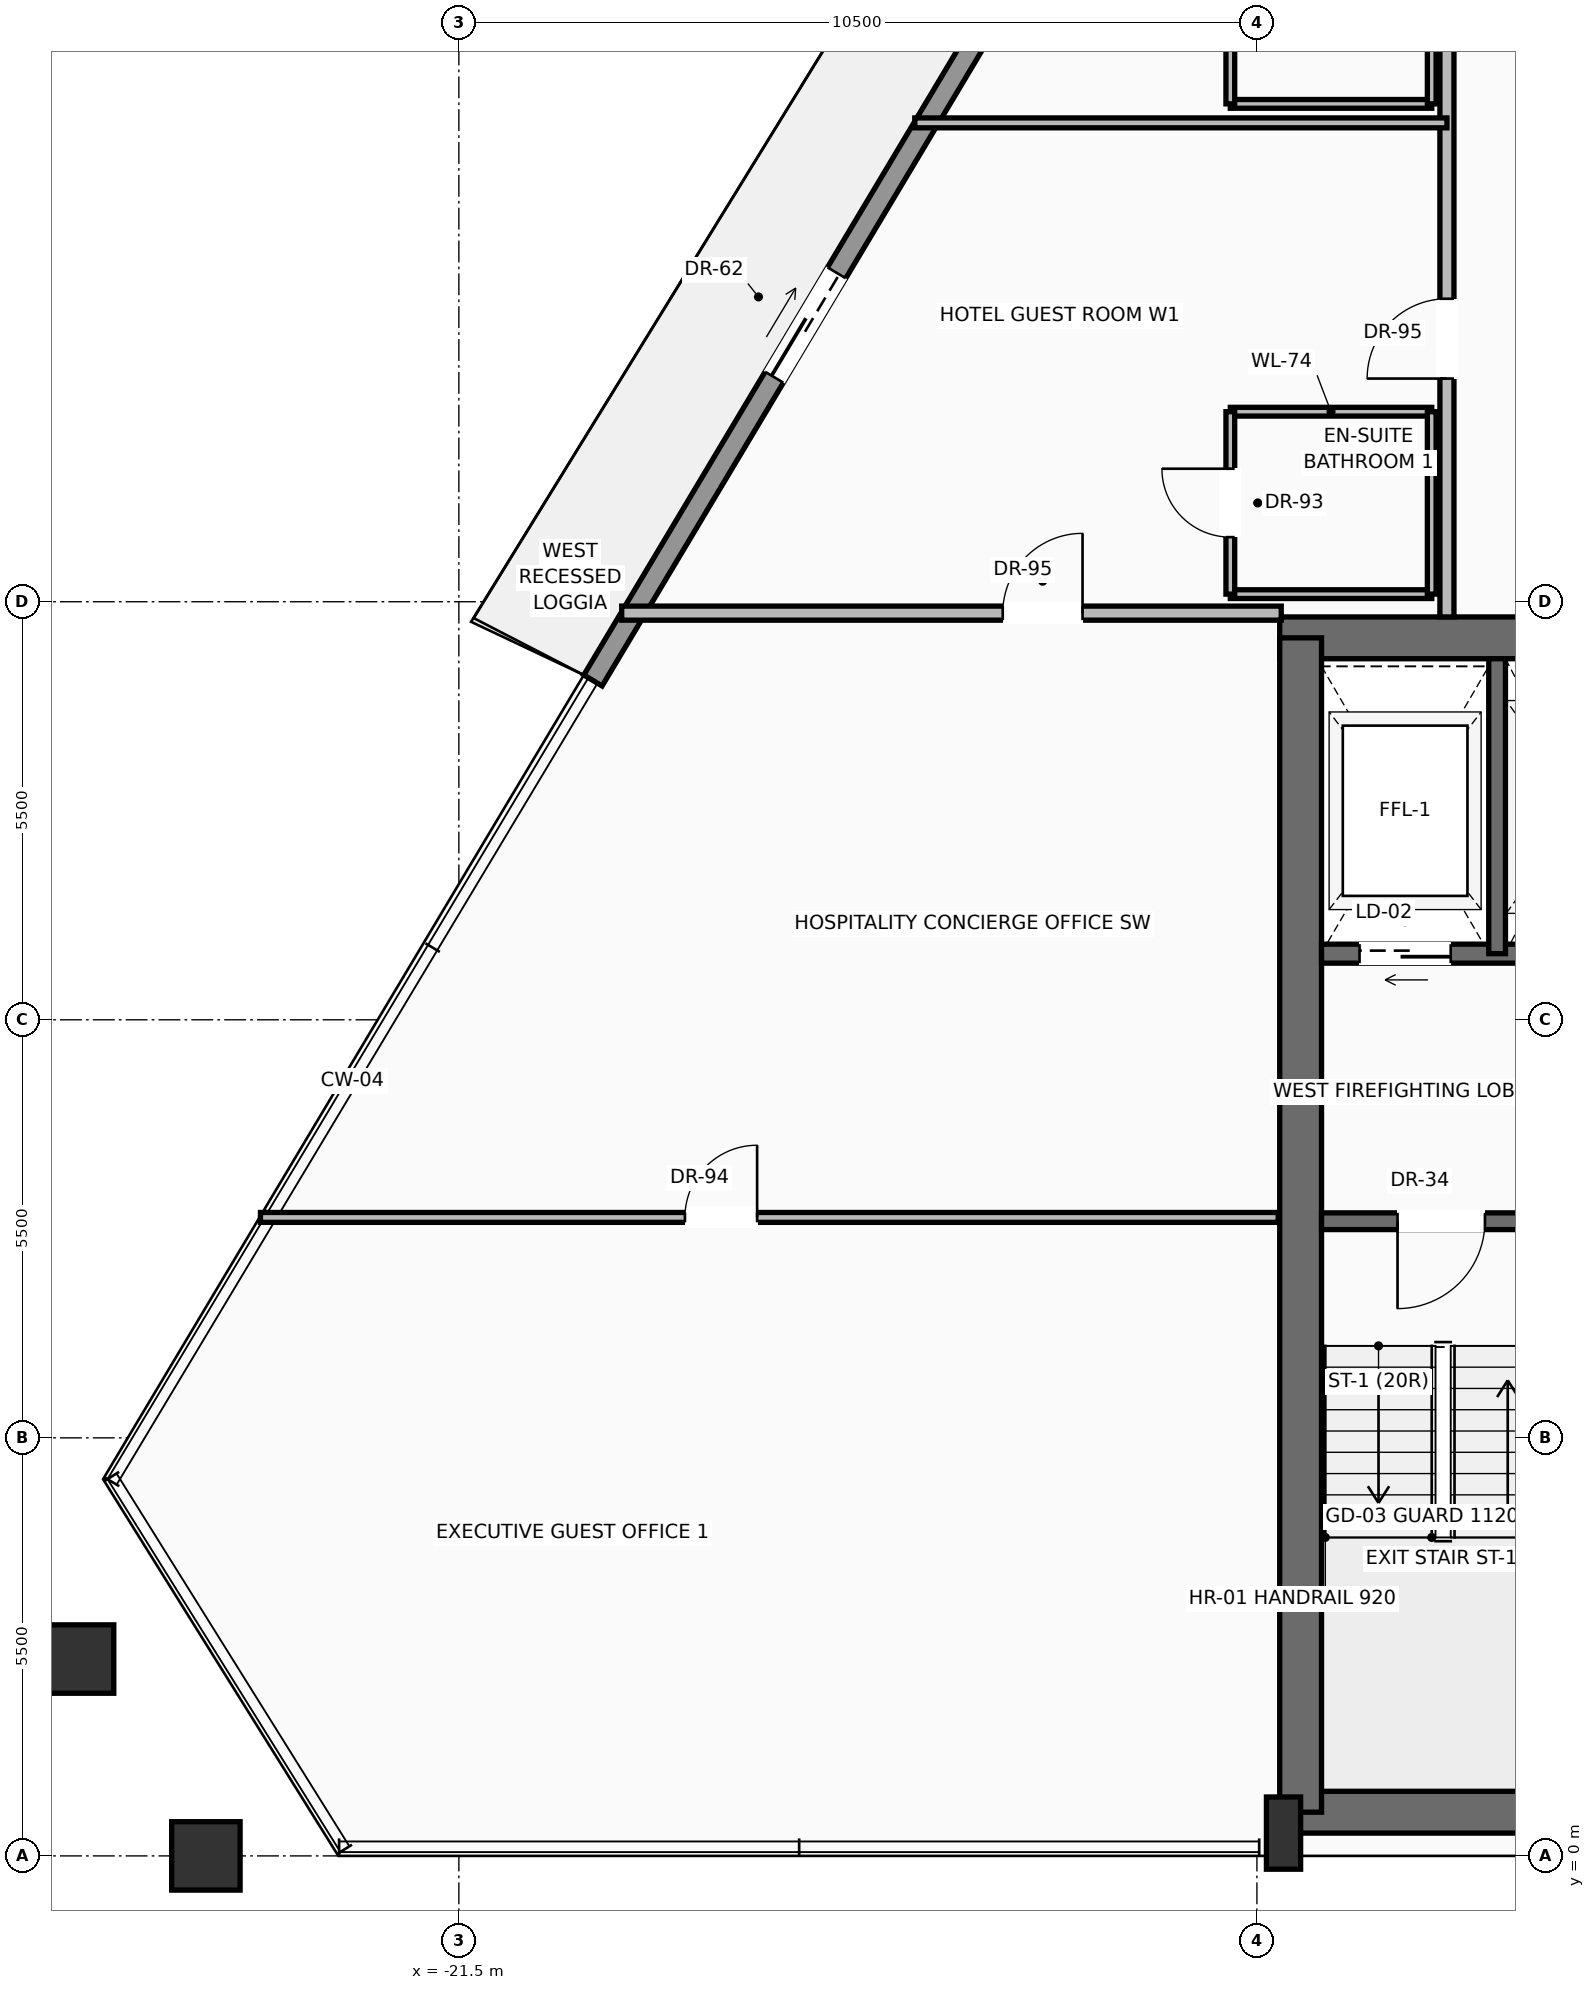
"""IFC4 building model, lengths in metres.
Left out: names, types, materials, properties, quantities, classifications, styles, units other than length and angle.
Written with IfcOpenShell. Run it as: python <this file> out.ifc"""

import sys

from ifc_helpers import new_model, si_unit, direction, frame, frame_2d, origin, origin_2d, place, context, subcontext, project, spatial, rectangle, hollow_rectangle, extrude, source, transform, mapped, element, fill, save


model = new_model("IFC4")
c1 = context("Model", 3, precision=1e-05, world=origin(), true_north=direction((0.0, 1.0)))
c2 = subcontext(c1, "Body", "Model", "MODEL_VIEW")
j1 = project(units=[si_unit("LENGTHUNIT", "METRE"), si_unit("PLANEANGLEUNIT", "RADIAN")], contexts=[c1])
p1 = place(None, origin())
s1 = spatial("IfcSite", under=j1, at=p1, CompositionType="ELEMENT")
p2 = place(p1, origin())
s2 = spatial("IfcBuilding", under=s1, at=p2, CompositionType="ELEMENT")
p3 = place(p2, frame((0.0, 0.0, 223.45)))
s3 = spatial("IfcBuildingStorey", under=s2, at=p3, CompositionType="ELEMENT", Elevation=223.45)
p4 = place(p3, frame((-10.65, 0.575, 0.0), z_axis=(0.0, 0.0, 1.0), x_axis=(1.0, 0.0, 0.0)))
e1 = element("IfcWall", 1, at=p4, inside=s3, PredefinedType="SHEAR", context=c2, shape_type="SweptSolid", body=[
    extrude(rectangle(XDim=21.3, YDim=0.55, at=frame_2d((10.65, 0.0))), origin(), (0.0, 0.0, 1.0), 3.24),
])
p5 = place(p3, frame((-10.7, 16.025, 0.0), z_axis=(0.0, 0.0, 1.0), x_axis=(1.0, 0.0, 0.0)))
e2 = element("IfcWall", 2, at=p5, inside=s3, PredefinedType="SHEAR", context=c2, shape_type="SweptSolid", body=[
    extrude(rectangle(XDim=21.4, YDim=0.55, at=frame_2d((10.7, 0.0))), origin(), (0.0, 0.0, 1.0), 3.24),
])
p6 = place(p5, frame((3.27, 0.0, 0.0)))
e3 = element("IfcOpeningElement", 3, at=p6, cuts=e2, PredefinedType="OPENING", context=c2, shape_type="SweptSolid", body=[
    extrude(rectangle(XDim=1.3, YDim=2.3, at=frame_2d((0.65, 1.15))), frame((0.0, 0.285, 0.0), z_axis=(0.0, -1.0, 0.0), x_axis=(1.0, 0.0, 0.0)), (0.0, 0.0, 1.0), 0.57),
])
p7 = place(p5, frame((9.7, 0.0, 0.0)))
e4 = element("IfcOpeningElement", 4, at=p7, cuts=e2, PredefinedType="OPENING", context=c2, shape_type="SweptSolid", body=[
    extrude(rectangle(XDim=2.0, YDim=2.4, at=frame_2d((1.0, 1.2))), frame((0.0, 0.285, 0.0), z_axis=(0.0, -1.0, 0.0), x_axis=(1.0, 0.0, 0.0)), (0.0, 0.0, 1.0), 0.57),
])
p8 = place(p3, frame((-10.425, 0.575, 0.0), z_axis=(0.0, 0.0, 1.0), x_axis=(0.0, 1.0, 0.0)))
e5 = element("IfcWall", 5, at=p8, inside=s3, PredefinedType="SHEAR", context=c2, shape_type="SweptSolid", body=[
    extrude(rectangle(XDim=15.45, YDim=0.55, at=frame_2d((7.725, 0.0))), origin(), (0.0, 0.0, 1.0), 3.24),
])
m1 = source(origin(), c2, "Body", "SweptSolid", [
    extrude(rectangle(XDim=0.45, YDim=0.95, at=origin_2d()), origin(), (0.0, 0.0, 1.0), 3.45),
])
p9 = place(p3, frame((-10.65, 0.3, 0.0), z_axis=(0.0, 0.0, 1.0), x_axis=(1.0, 0.0, 0.0)))
e6 = element("IfcColumn", 6, at=p9, inside=s3, PredefinedType="PILASTER", context=c2, shape_type="MappedRepresentation", body=[
    mapped(m1, transform((0.0, 0.0, 0.0), scale=1.0)),
])
m2 = source(origin(), c2, "Body", "SweptSolid", [
    extrude(hollow_rectangle(XDim=0.9, YDim=0.9, WallThickness=0.045, at=origin_2d()), origin(), (0.0, 0.0, 1.0), 3.441),
])
p10 = place(p3, frame((-24.828, 0.0, 0.004), z_axis=(-0.004753404971, 0.0, 0.999988702507), x_axis=(0.0, -1.0, 0.0)))
e7 = element("IfcColumn", 7, at=p10, inside=s3, PredefinedType="COLUMN", context=c2, shape_type="MappedRepresentation", body=[
    mapped(m2, transform((0.0, 0.0, 0.0), scale=1.0)),
])
m3 = source(origin(), c2, "Body", "SweptSolid", [
    extrude(hollow_rectangle(XDim=0.9, YDim=0.9, WallThickness=0.045, at=origin_2d()), origin(), (0.0, 0.0, 1.0), 3.442),
])
p11 = place(p3, frame((-26.49, 2.59, 0.004), z_axis=(0.007589951028, -0.017591662196, 0.999816446186), x_axis=(0.918184808278, 0.396152316475, 0.0)))
e8 = element("IfcColumn", 8, at=p11, inside=s3, PredefinedType="COLUMN", context=c2, shape_type="MappedRepresentation", body=[
    mapped(m3, transform((0.0, 0.0, 0.0), scale=1.0)),
])
p12 = place(p3, frame((-19.736, 15.464, 0.0), z_axis=(0.0, 0.0, 1.0), x_axis=(0.513136432844, 0.858307055364, 0.0)))
e9 = element("IfcWall", 9, at=p12, inside=s3, PredefinedType="SOLIDWALL", context=c2, shape_type="SweptSolid", body=[
    extrude(rectangle(XDim=19.37, YDim=0.28, at=frame_2d((9.685, 0.0))), origin(), (0.0, 0.0, 1.0), 2.82),
])
p13 = place(p12, frame((4.649, 0.0, 0.0)))
e10 = element("IfcOpeningElement", 10, at=p13, cuts=e9, PredefinedType="OPENING", context=c2, shape_type="SweptSolid", body=[
    extrude(rectangle(XDim=1.6, YDim=2.35, at=frame_2d((0.8, 1.175))), frame((0.0, 0.15, 0.0), z_axis=(0.0, -1.0, 0.0), x_axis=(1.0, 0.0, 0.0)), (0.0, 0.0, 1.0), 0.3),
])
p14 = place(p12, frame((13.171, 0.0, 0.9)))
e11 = element("IfcOpeningElement", 11, at=p14, cuts=e9, PredefinedType="OPENING", context=c2, shape_type="SweptSolid", body=[
    extrude(rectangle(XDim=1.55, YDim=1.75, at=frame_2d((0.775, 0.875))), frame((0.0, 0.15, 0.0), z_axis=(0.0, -1.0, 0.0), x_axis=(1.0, 0.0, 0.0)), (0.0, 0.0, 1.0), 0.3),
])
p15 = place(p3, frame((-5.5, 8.35, 0.0), z_axis=(0.0, 0.0, 1.0), x_axis=(-1.0, 0.0, 0.0)))
e12 = element("IfcWall", 12, at=p15, inside=s3, PredefinedType="SOLIDWALL", context=c2, shape_type="SweptSolid", body=[
    extrude(rectangle(XDim=4.65, YDim=0.22, at=frame_2d((2.325, 0.0))), origin(), (0.0, 0.0, 1.0), 3.24),
])
p16 = place(p15, frame((2.5, 0.0, 0.0)))
e13 = element("IfcOpeningElement", 13, at=p16, cuts=e12, PredefinedType="OPENING", context=c2, shape_type="SweptSolid", body=[
    extrude(rectangle(XDim=1.15, YDim=2.2, at=frame_2d((0.575, 1.1))), frame((0.0, 0.12, 0.0), z_axis=(0.0, -1.0, 0.0), x_axis=(1.0, 0.0, 0.0)), (0.0, 0.0, 1.0), 0.24),
])
p17 = place(p3, frame((-5.5, 11.87, 0.0), z_axis=(0.0, 0.0, 1.0), x_axis=(-1.0, 0.0, 0.0)))
e14 = element("IfcWall", 14, at=p17, inside=s3, PredefinedType="SOLIDWALL", context=c2, shape_type="SweptSolid", body=[
    extrude(rectangle(XDim=4.65, YDim=0.25, at=frame_2d((2.325, 0.0))), origin(), (0.0, 0.0, 1.0), 3.24),
])
p18 = place(p17, frame((2.95, 0.0, 0.0)))
e15 = element("IfcOpeningElement", 15, at=p18, cuts=e14, PredefinedType="OPENING", context=c2, shape_type="SweptSolid", body=[
    extrude(rectangle(XDim=1.2, YDim=2.25, at=frame_2d((0.6, 1.125))), frame((0.0, 0.135, 0.0), z_axis=(0.0, -1.0, 0.0), x_axis=(1.0, 0.0, 0.0)), (0.0, 0.0, 1.0), 0.27),
])
p19 = place(p3, frame((-7.84, 11.87, 0.0), z_axis=(0.0, 0.0, 1.0), x_axis=(0.0, 1.0, 0.0)))
e16 = element("IfcWall", 16, at=p19, inside=s3, PredefinedType="SOLIDWALL", context=c2, shape_type="SweptSolid", body=[
    extrude(rectangle(XDim=3.88, YDim=0.22, at=frame_2d((1.94, 0.0))), origin(), (0.0, 0.0, 1.0), 3.24),
])
p20 = place(p3, frame((-8.5, 16.3, 0.0), z_axis=(0.0, 0.0, 1.0), x_axis=(0.0, 1.0, 0.0)))
e17 = element("IfcWall", 17, at=p20, inside=s3, PredefinedType="PARTITIONING", context=c2, shape_type="SweptSolid", body=[
    extrude(rectangle(XDim=13.3, YDim=0.185, at=frame_2d((6.65, 0.0))), origin(), (0.0, 0.0, 1.0), 3.232),
])
p21 = place(p20, frame((3.136, 0.0, 0.0)))
e18 = element("IfcOpeningElement", 18, at=p21, cuts=e17, PredefinedType="OPENING", context=c2, shape_type="SweptSolid", body=[
    extrude(rectangle(XDim=1.05, YDim=2.25, at=frame_2d((0.525, 1.125))), frame((0.0, 0.103, 0.0), z_axis=(0.0, -1.0, 0.0), x_axis=(1.0, 0.0, 0.0)), (0.0, 0.0, 1.0), 0.205),
])
p22 = place(p20, frame((9.256, 0.0, 0.0)))
e19 = element("IfcOpeningElement", 19, at=p22, cuts=e17, PredefinedType="OPENING", context=c2, shape_type="SweptSolid", body=[
    extrude(rectangle(XDim=1.05, YDim=2.25, at=frame_2d((0.525, 1.125))), frame((0.0, 0.103, 0.0), z_axis=(0.0, -1.0, 0.0), x_axis=(1.0, 0.0, 0.0)), (0.0, 0.0, 1.0), 0.205),
])
p23 = place(p3, frame((-19.358, 16.35, 0.0), z_axis=(0.0, 0.0, 1.0), x_axis=(1.0, 0.0, 0.0)))
e20 = element("IfcWall", 20, at=p23, inside=s3, PredefinedType="PARTITIONING", context=c2, shape_type="SweptSolid", body=[
    extrude(rectangle(XDim=8.678, YDim=0.185, at=frame_2d((4.339, 0.0))), origin(), (0.0, 0.0, 1.0), 3.232),
])
p24 = place(p23, frame((5.013, 0.0, 0.0)))
e21 = element("IfcOpeningElement", 21, at=p24, cuts=e20, PredefinedType="OPENING", context=c2, shape_type="SweptSolid", body=[
    extrude(rectangle(XDim=1.05, YDim=2.25, at=frame_2d((0.525, 1.125))), frame((0.0, 0.103, 0.0), z_axis=(0.0, -1.0, 0.0), x_axis=(1.0, 0.0, 0.0)), (0.0, 0.0, 1.0), 0.205),
])
p25 = place(p3, frame((-24.111, 8.4, 0.0), z_axis=(0.0, 0.0, 1.0), x_axis=(1.0, 0.0, 0.0)))
e22 = element("IfcWall", 22, at=p25, inside=s3, PredefinedType="PARTITIONING", context=c2, shape_type="SweptSolid", body=[
    extrude(rectangle(XDim=13.391, YDim=0.13, at=frame_2d((6.695, 0.0))), origin(), (0.0, 0.0, 1.0), 3.232),
])
p26 = place(p25, frame((5.585, 0.0, 0.0)))
e23 = element("IfcOpeningElement", 23, at=p26, cuts=e22, PredefinedType="OPENING", context=c2, shape_type="SweptSolid", body=[
    extrude(rectangle(XDim=0.95, YDim=2.2, at=frame_2d((0.475, 1.1))), frame((0.0, 0.075, 0.0), z_axis=(0.0, -1.0, 0.0), x_axis=(1.0, 0.0, 0.0)), (0.0, 0.0, 1.0), 0.15),
])
for number, where, z_axis, x_axis in (
    (24, (-11.35, 16.6, 0.0), (0.0, 0.0, 1.0), (1.0, 0.0, 0.0)),
    (25, (-11.35, 19.0, 0.0), (0.0, 0.0, 1.0), (1.0, 0.0, 0.0)),
):
    element("IfcWall", number, at=place(p3, frame(where, z_axis=z_axis, x_axis=x_axis)), inside=s3, PredefinedType="PARTITIONING", context=c2, shape_type="SweptSolid", body=[
        extrude(rectangle(XDim=2.65, YDim=0.115, at=frame_2d((1.325, 0.0))), origin(), (0.0, 0.0, 1.0), 3.232),
    ])
p27 = place(p3, frame((-11.35, 16.6, 0.0), z_axis=(0.0, 0.0, 1.0), x_axis=(0.0, 1.0, 0.0)))
e26 = element("IfcWall", 26, at=p27, inside=s3, PredefinedType="PARTITIONING", context=c2, shape_type="SweptSolid", body=[
    extrude(rectangle(XDim=2.4, YDim=0.115, at=frame_2d((1.2, 0.0))), origin(), (0.0, 0.0, 1.0), 3.232),
])
p28 = place(p27, frame((0.75, 0.0, 0.0)))
e27 = element("IfcOpeningElement", 27, at=p28, cuts=e26, PredefinedType="OPENING", context=c2, shape_type="SweptSolid", body=[
    extrude(rectangle(XDim=0.9, YDim=2.15, at=frame_2d((0.45, 1.075))), frame((0.0, 0.067, 0.0), z_axis=(0.0, -1.0, 0.0), x_axis=(1.0, 0.0, 0.0)), (0.0, 0.0, 1.0), 0.135),
])
p29 = place(p3, frame((-8.7, 16.6, 0.0), z_axis=(0.0, 0.0, 1.0), x_axis=(0.0, 1.0, 0.0)))
e28 = element("IfcWall", 28, at=p29, inside=s3, PredefinedType="PARTITIONING", context=c2, shape_type="SweptSolid", body=[
    extrude(rectangle(XDim=2.4, YDim=0.115, at=frame_2d((1.2, 0.0))), origin(), (0.0, 0.0, 1.0), 3.232),
])
p30 = place(p3, frame((-15.501, 22.8, 0.0), z_axis=(0.0, 0.0, 1.0), x_axis=(1.0, 0.0, 0.0)))
e29 = element("IfcWall", 29, at=p30, inside=s3, PredefinedType="PARTITIONING", context=c2, shape_type="SweptSolid", body=[
    extrude(rectangle(XDim=7.001, YDim=0.13, at=frame_2d((3.501, 0.0))), origin(), (0.0, 0.0, 1.0), 3.232),
])
p31 = place(p3, frame((-11.35, 23.05, 0.0), z_axis=(0.0, 0.0, 1.0), x_axis=(1.0, 0.0, 0.0)))
e30 = element("IfcWall", 30, at=p31, inside=s3, PredefinedType="PARTITIONING", context=c2, shape_type="SweptSolid", body=[
    extrude(rectangle(XDim=2.65, YDim=0.115, at=frame_2d((1.325, 0.0))), origin(), (0.0, 0.0, 1.0), 3.232),
])
p32 = place(p3, frame((-11.35, 23.05, 0.0), z_axis=(0.0, 0.0, 1.0), x_axis=(0.0, 1.0, 0.0)))
e31 = element("IfcWall", 31, at=p32, inside=s3, PredefinedType="PARTITIONING", context=c2, shape_type="SweptSolid", body=[
    extrude(rectangle(XDim=2.4, YDim=0.115, at=frame_2d((1.2, 0.0))), origin(), (0.0, 0.0, 1.0), 3.232),
])
p33 = place(p32, frame((0.75, 0.0, 0.0)))
e32 = element("IfcOpeningElement", 32, at=p33, cuts=e31, PredefinedType="OPENING", context=c2, shape_type="SweptSolid", body=[
    extrude(rectangle(XDim=0.9, YDim=2.15, at=frame_2d((0.45, 1.075))), frame((0.0, 0.067, 0.0), z_axis=(0.0, -1.0, 0.0), x_axis=(1.0, 0.0, 0.0)), (0.0, 0.0, 1.0), 0.135),
])
p34 = place(p3, frame((-8.7, 23.05, 0.0), z_axis=(0.0, 0.0, 1.0), x_axis=(0.0, 1.0, 0.0)))
e33 = element("IfcWall", 33, at=p34, inside=s3, PredefinedType="PARTITIONING", context=c2, shape_type="SweptSolid", body=[
    extrude(rectangle(XDim=2.4, YDim=0.115, at=frame_2d((1.2, 0.0))), origin(), (0.0, 0.0, 1.0), 3.232),
])
m4 = source(origin(), c2, "Body", "SweptSolid", [
    extrude(rectangle(XDim=1.6, YDim=2.35, at=frame_2d((0.8, 1.175))), frame((0.0, 0.025, 0.0), z_axis=(0.0, -1.0, 0.0), x_axis=(1.0, 0.0, 0.0)), (0.0, 0.0, 1.0), 0.05),
])
p35 = place(p13, origin())
e34 = element("IfcDoor", 34, at=p35, inside=s3, OperationType="SLIDING_TO_LEFT", PredefinedType="DOOR", context=c2, shape_type="MappedRepresentation", body=[
    mapped(m4, transform((0.0, 0.0, 0.0), scale=1.0)),
])
fill(e10, e34)
m5 = source(origin(), c2, "Body", "SweptSolid", [
    extrude(rectangle(XDim=1.15, YDim=2.2, at=frame_2d((0.575, 1.1))), frame((0.0, 0.025, 0.0), z_axis=(0.0, -1.0, 0.0), x_axis=(1.0, 0.0, 0.0)), (0.0, 0.0, 1.0), 0.05),
])
p36 = place(p16, origin())
e35 = element("IfcDoor", 35, at=p36, inside=s3, OperationType="SINGLE_SWING_RIGHT", PredefinedType="DOOR", context=c2, shape_type="MappedRepresentation", body=[
    mapped(m5, transform((0.0, 0.0, 0.0), scale=1.0)),
])
fill(e13, e35)
m6 = source(origin(), c2, "Body", "SweptSolid", [
    extrude(rectangle(XDim=1.2, YDim=2.25, at=frame_2d((0.6, 1.125))), frame((0.0, 0.025, 0.0), z_axis=(0.0, -1.0, 0.0), x_axis=(1.0, 0.0, 0.0)), (0.0, 0.0, 1.0), 0.05),
])
p37 = place(p18, origin())
e36 = element("IfcDoor", 36, at=p37, inside=s3, OperationType="SLIDING_TO_LEFT", PredefinedType="DOOR", context=c2, shape_type="MappedRepresentation", body=[
    mapped(m6, transform((0.0, 0.0, 0.0), scale=1.0)),
])
fill(e15, e36)
m7 = source(origin(), c2, "Body", "SweptSolid", [
    extrude(rectangle(XDim=1.05, YDim=2.25, at=frame_2d((0.525, 1.125))), frame((0.0, 0.025, 0.0), z_axis=(0.0, -1.0, 0.0), x_axis=(1.0, 0.0, 0.0)), (0.0, 0.0, 1.0), 0.05),
])
p38 = place(p24, origin())
e37 = element("IfcDoor", 37, at=p38, inside=s3, OperationType="SINGLE_SWING_RIGHT", PredefinedType="DOOR", context=c2, shape_type="MappedRepresentation", body=[
    mapped(m7, transform((0.0, 0.0, 0.0), scale=1.0)),
])
fill(e21, e37)
m8 = source(origin(), c2, "Body", "SweptSolid", [
    extrude(rectangle(XDim=0.95, YDim=2.2, at=frame_2d((0.475, 1.1))), frame((0.0, 0.025, 0.0), z_axis=(0.0, -1.0, 0.0), x_axis=(1.0, 0.0, 0.0)), (0.0, 0.0, 1.0), 0.05),
])
p39 = place(p26, origin())
e38 = element("IfcDoor", 38, at=p39, inside=s3, OperationType="SINGLE_SWING_RIGHT", PredefinedType="DOOR", context=c2, shape_type="MappedRepresentation", body=[
    mapped(m8, transform((0.0, 0.0, 0.0), scale=1.0)),
])
fill(e23, e38)
p40 = place(p21, origin())
e39 = element("IfcDoor", 39, at=p40, inside=s3, OperationType="SINGLE_SWING_LEFT", PredefinedType="DOOR", context=c2, shape_type="MappedRepresentation", body=[
    mapped(m7, transform((0.0, 0.0, 0.0), scale=1.0)),
])
fill(e18, e39)
m9 = source(origin(), c2, "Body", "SweptSolid", [
    extrude(rectangle(XDim=0.9, YDim=2.15, at=frame_2d((0.45, 1.075))), frame((0.0, 0.025, 0.0), z_axis=(0.0, -1.0, 0.0), x_axis=(1.0, 0.0, 0.0)), (0.0, 0.0, 1.0), 0.05),
])
p41 = place(p28, origin())
e40 = element("IfcDoor", 40, at=p41, inside=s3, OperationType="SINGLE_SWING_RIGHT", PredefinedType="DOOR", context=c2, shape_type="MappedRepresentation", body=[
    mapped(m9, transform((0.0, 0.0, 0.0), scale=1.0)),
])
fill(e27, e40)
save(model, sys.argv[1])
